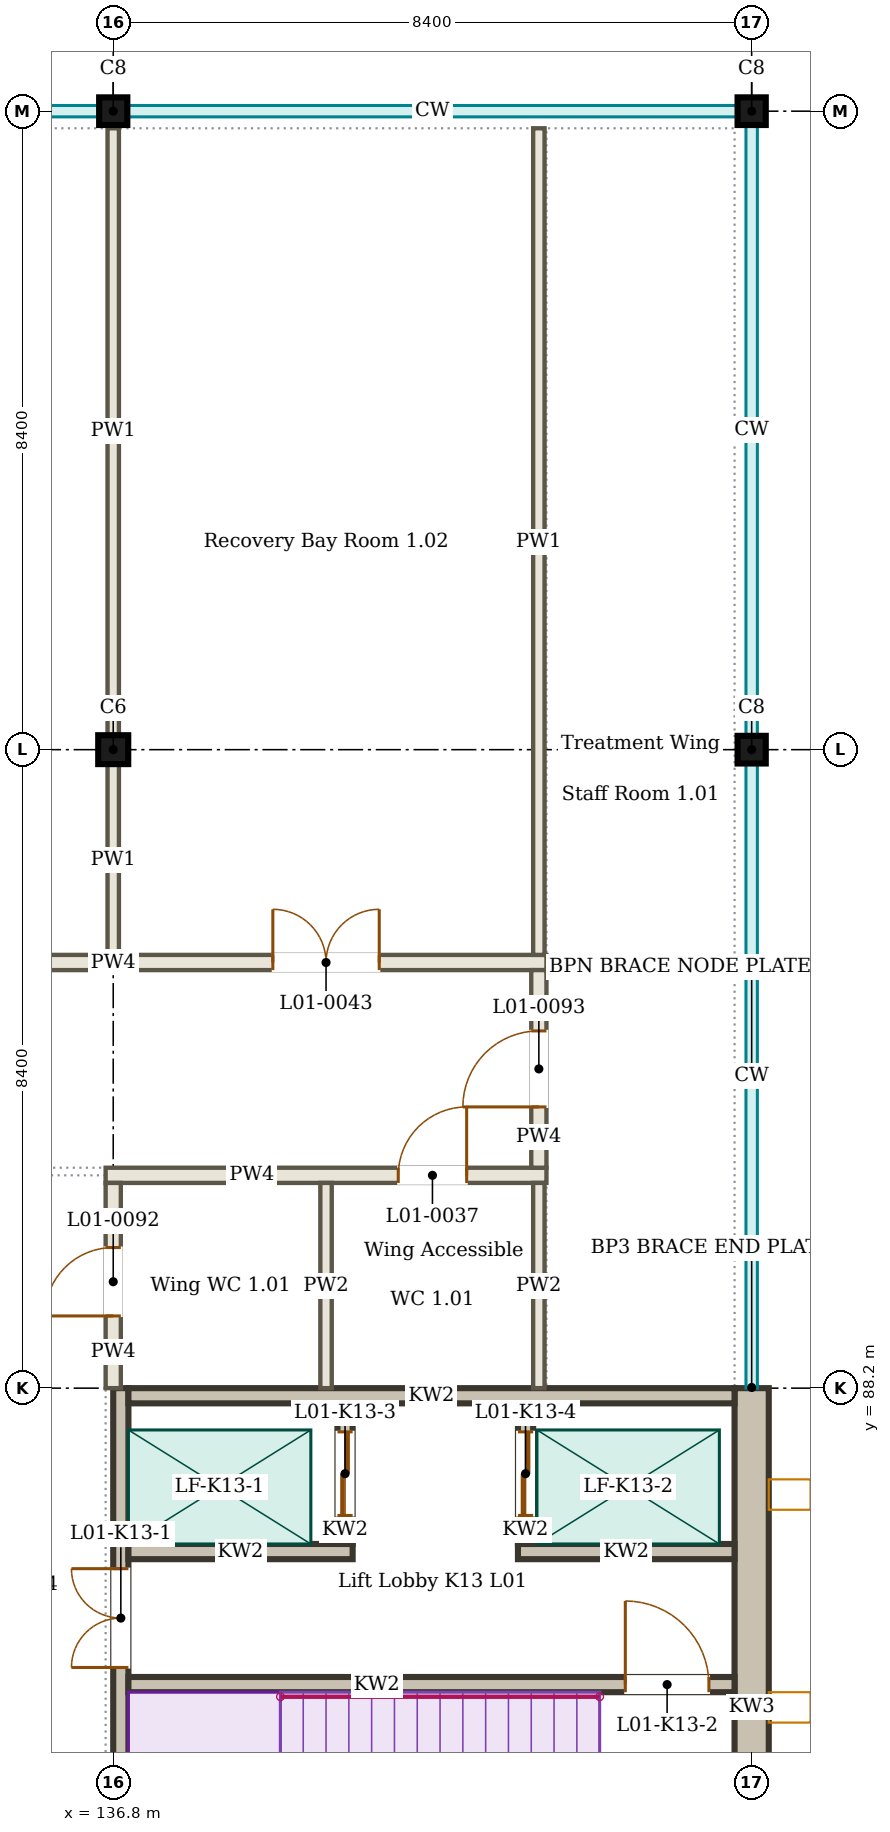
"""IFC4 building model, lengths in metres.
Left out: names, types, materials, properties, quantities, classifications, styles, units other than length and angle.
Written with IfcOpenShell. Run it as: python <this file> out.ifc"""

import sys

from ifc_helpers import new_model, si_unit, direction, frame, frame_2d, origin, origin_2d, place, context, subcontext, project, spatial, rectangle, i_section, extrude, element, fill, save


model = new_model("IFC4")
c1 = context("Model", 3, precision=1e-05, world=origin(), true_north=direction((0.0, 1.0)))
c2 = subcontext(c1, "Body", "Model", "MODEL_VIEW")
j1 = project(units=[si_unit("LENGTHUNIT", "METRE"), si_unit("PLANEANGLEUNIT", "RADIAN")], contexts=[c1])
p1 = place(None, origin())
s1 = spatial("IfcSite", under=j1, at=p1, CompositionType="ELEMENT")
p2 = place(p1, origin())
s2 = spatial("IfcBuilding", under=s1, at=p2, CompositionType="ELEMENT")
p3 = place(p2, frame((0.0, 0.0, 4.5)))
s3 = spatial("IfcBuildingStorey", under=s2, at=p3, CompositionType="ELEMENT", Elevation=4.5)
p4 = place(p3, frame((136.8, 96.6, 0.0), z_axis=(0.0, 0.0, 1.0), x_axis=(1.0, 0.0, 0.0)))
e1 = element("IfcColumn", 1, at=p4, inside=s3, PredefinedType="COLUMN", context=c2, shape_type="SweptSolid", body=[
    extrude(i_section(OverallWidth=0.395, OverallDepth=0.38, WebThickness=0.019, FlangeThickness=0.03, FilletRadius=0.027, at=origin_2d()), origin(), (0.0, 0.0, 1.0), 4.5),
])
for number, where, z_axis, x_axis in (
    (2, (145.2, 96.6, 0.0), (0.0, 0.0, 1.0), (1.0, 0.0, 0.0)),
    (3, (136.8, 105.0, 0.0), (0.0, 0.0, 1.0), (1.0, 0.0, 0.0)),
    (4, (145.2, 105.0, 0.0), (0.0, 0.0, 1.0), (1.0, 0.0, 0.0)),
):
    element("IfcColumn", number, at=place(p3, frame(where, z_axis=z_axis, x_axis=x_axis)), inside=s3, PredefinedType="COLUMN", context=c2, shape_type="SweptSolid", body=[
        extrude(i_section(OverallWidth=0.371, OverallDepth=0.364, WebThickness=0.013, FlangeThickness=0.022, FilletRadius=0.027, at=origin_2d()), origin(), (0.0, 0.0, 1.0), 4.5),
    ])
p5 = place(p3, frame((136.8, 105.16, 3.87), z_axis=(0.0, 0.0, 1.0), x_axis=(1.0, 0.0, 0.0)))
e5 = element("IfcWall", 5, at=p5, inside=s3, PredefinedType="SOLIDWALL", context=c2, shape_type="SweptSolid", body=[
    extrude(rectangle(XDim=8.4, YDim=0.13, at=frame_2d((4.2, 0.0))), origin(), (0.0, 0.0, 1.0), 0.63),
])
p6 = place(p3, frame((136.7, 91.0, 0.0), z_axis=(0.0, 0.0, 1.0), x_axis=(1.0, 0.0, 0.0)))
e6 = element("IfcWall", 6, at=p6, inside=s3, PredefinedType="PARTITIONING", context=c2, shape_type="SweptSolid", body=[
    extrude(rectangle(XDim=5.8, YDim=0.2, at=frame_2d((2.9, 0.0))), origin(), (0.0, 0.0, 1.0), 3.8),
])
p7 = place(p6, frame((3.85, 0.0, 0.0)))
e7 = element("IfcOpeningElement", 7, at=p7, cuts=e6, PredefinedType="OPENING", context=c2, shape_type="SweptSolid", body=[
    extrude(rectangle(XDim=0.9, YDim=2.1, at=frame_2d((0.45, 1.05))), frame((0.0, 0.11, 0.0), z_axis=(0.0, -1.0, 0.0), x_axis=(1.0, 0.0, 0.0)), (0.0, 0.0, 1.0), 0.22),
])
p8 = place(p3, frame((119.9, 93.8, 0.0), z_axis=(0.0, 0.0, 1.0), x_axis=(1.0, 0.0, 0.0)))
e8 = element("IfcWall", 8, at=p8, inside=s3, PredefinedType="PARTITIONING", context=c2, shape_type="SweptSolid", body=[
    extrude(rectangle(XDim=22.6, YDim=0.2, at=frame_2d((11.3, 0.0))), origin(), (0.0, 0.0, 1.0), 3.8),
])
p9 = place(p8, frame((0.8, 0.0, 0.0)))
e9 = element("IfcOpeningElement", 9, at=p9, cuts=e8, PredefinedType="OPENING", context=c2, shape_type="SweptSolid", body=[
    extrude(rectangle(XDim=1.4, YDim=2.1, at=frame_2d((0.7, 1.05))), frame((0.0, 0.11, 0.0), z_axis=(0.0, -1.0, 0.0), x_axis=(1.0, 0.0, 0.0)), (0.0, 0.0, 1.0), 0.22),
])
p10 = place(p8, frame((3.6, 0.0, 0.0)))
e10 = element("IfcOpeningElement", 10, at=p10, cuts=e8, PredefinedType="OPENING", context=c2, shape_type="SweptSolid", body=[
    extrude(rectangle(XDim=1.4, YDim=2.1, at=frame_2d((0.7, 1.05))), frame((0.0, 0.11, 0.0), z_axis=(0.0, -1.0, 0.0), x_axis=(1.0, 0.0, 0.0)), (0.0, 0.0, 1.0), 0.22),
])
p11 = place(p8, frame((6.4, 0.0, 0.0)))
e11 = element("IfcOpeningElement", 11, at=p11, cuts=e8, PredefinedType="OPENING", context=c2, shape_type="SweptSolid", body=[
    extrude(rectangle(XDim=1.4, YDim=2.1, at=frame_2d((0.7, 1.05))), frame((0.0, 0.11, 0.0), z_axis=(0.0, -1.0, 0.0), x_axis=(1.0, 0.0, 0.0)), (0.0, 0.0, 1.0), 0.22),
])
p12 = place(p8, frame((9.2, 0.0, 0.0)))
e12 = element("IfcOpeningElement", 12, at=p12, cuts=e8, PredefinedType="OPENING", context=c2, shape_type="SweptSolid", body=[
    extrude(rectangle(XDim=1.4, YDim=2.1, at=frame_2d((0.7, 1.05))), frame((0.0, 0.11, 0.0), z_axis=(0.0, -1.0, 0.0), x_axis=(1.0, 0.0, 0.0)), (0.0, 0.0, 1.0), 0.22),
])
p13 = place(p8, frame((13.4, 0.0, 0.0)))
e13 = element("IfcOpeningElement", 13, at=p13, cuts=e8, PredefinedType="OPENING", context=c2, shape_type="SweptSolid", body=[
    extrude(rectangle(XDim=1.4, YDim=2.1, at=frame_2d((0.7, 1.05))), frame((0.0, 0.11, 0.0), z_axis=(0.0, -1.0, 0.0), x_axis=(1.0, 0.0, 0.0)), (0.0, 0.0, 1.0), 0.22),
])
p14 = place(p8, frame((19.0, 0.0, 0.0)))
e14 = element("IfcOpeningElement", 14, at=p14, cuts=e8, PredefinedType="OPENING", context=c2, shape_type="SweptSolid", body=[
    extrude(rectangle(XDim=1.4, YDim=2.1, at=frame_2d((0.7, 1.05))), frame((0.0, 0.11, 0.0), z_axis=(0.0, -1.0, 0.0), x_axis=(1.0, 0.0, 0.0)), (0.0, 0.0, 1.0), 0.22),
])
p15 = place(p3, frame((136.8, 88.2, 0.0), z_axis=(0.0, 0.0, 1.0), x_axis=(0.0, 1.0, 0.0)))
e15 = element("IfcWall", 15, at=p15, inside=s3, PredefinedType="PARTITIONING", context=c2, shape_type="SweptSolid", body=[
    extrude(rectangle(XDim=2.7, YDim=0.2, at=frame_2d((1.35, 0.0))), origin(), (0.0, 0.0, 1.0), 3.8),
])
p16 = place(p15, frame((0.95, 0.0, 0.0)))
e16 = element("IfcOpeningElement", 16, at=p16, cuts=e15, PredefinedType="OPENING", context=c2, shape_type="SweptSolid", body=[
    extrude(rectangle(XDim=0.9, YDim=2.1, at=frame_2d((0.45, 1.05))), frame((0.0, 0.11, 0.0), z_axis=(0.0, -1.0, 0.0), x_axis=(1.0, 0.0, 0.0)), (0.0, 0.0, 1.0), 0.22),
])
p17 = place(p3, frame((136.8, 93.9, 0.0), z_axis=(0.0, 0.0, 1.0), x_axis=(0.0, 1.0, 0.0)))
e17 = element("IfcWall", 17, at=p17, inside=s3, PredefinedType="PARTITIONING", context=c2, shape_type="SweptSolid", body=[
    extrude(rectangle(XDim=2.503, YDim=0.15, at=frame_2d((1.251, 0.0))), origin(), (0.0, 0.0, 1.0), 3.8),
])
p18 = place(p3, frame((136.8, 96.798, 0.0), z_axis=(0.0, 0.0, 1.0), x_axis=(0.0, 1.0, 0.0)))
e18 = element("IfcWall", 18, at=p18, inside=s3, PredefinedType="PARTITIONING", context=c2, shape_type="SweptSolid", body=[
    extrude(rectangle(XDim=7.977, YDim=0.15, at=frame_2d((3.989, 0.0))), origin(), (0.0, 0.0, 1.0), 3.8),
])
for number, where, z_axis, x_axis in (
    (19, (139.6, 88.2, 0.0), (0.0, 0.0, 1.0), (0.0, 1.0, 0.0)),
    (20, (142.4, 88.2, 0.0), (0.0, 0.0, 1.0), (0.0, 1.0, 0.0)),
):
    element("IfcWall", number, at=place(p3, frame(where, z_axis=z_axis, x_axis=x_axis)), inside=s3, PredefinedType="PARTITIONING", context=c2, shape_type="SweptSolid", body=[
        extrude(rectangle(XDim=2.7, YDim=0.15, at=frame_2d((1.35, 0.0))), origin(), (0.0, 0.0, 1.0), 3.95),
    ])
p19 = place(p3, frame((142.4, 91.1, 0.0), z_axis=(0.0, 0.0, 1.0), x_axis=(0.0, 1.0, 0.0)))
e21 = element("IfcWall", 21, at=p19, inside=s3, PredefinedType="PARTITIONING", context=c2, shape_type="SweptSolid", body=[
    extrude(rectangle(XDim=2.6, YDim=0.2, at=frame_2d((1.3, 0.0))), origin(), (0.0, 0.0, 1.0), 3.95),
])
p20 = place(p19, frame((0.8, 0.0, 0.0)))
e22 = element("IfcOpeningElement", 22, at=p20, cuts=e21, PredefinedType="OPENING", context=c2, shape_type="SweptSolid", body=[
    extrude(rectangle(XDim=1.0, YDim=2.1, at=frame_2d((0.5, 1.05))), frame((0.0, 0.11, 0.0), z_axis=(0.0, -1.0, 0.0), x_axis=(1.0, 0.0, 0.0)), (0.0, 0.0, 1.0), 0.22),
])
p21 = place(p3, frame((142.4, 93.9, 0.0), z_axis=(0.0, 0.0, 1.0), x_axis=(0.0, 1.0, 0.0)))
e23 = element("IfcWall", 23, at=p21, inside=s3, PredefinedType="PARTITIONING", context=c2, shape_type="SweptSolid", body=[
    extrude(rectangle(XDim=10.875, YDim=0.15, at=frame_2d((5.438, 0.0))), origin(), (0.0, 0.0, 1.0), 3.8),
])
p22 = place(p3, frame((136.9, 79.8, 0.0), z_axis=(0.0, 0.0, 1.0), x_axis=(0.0, 1.0, 0.0)))
e24 = element("IfcWall", 24, at=p22, inside=s3, PredefinedType="SOLIDWALL", context=c2, shape_type="SweptSolid", body=[
    extrude(rectangle(XDim=8.4, YDim=0.2, at=frame_2d((4.2, 0.0))), origin(), (0.0, 0.0, 1.0), 4.5),
])
p23 = place(p22, frame((4.725, 0.0, 0.0)))
e25 = element("IfcOpeningElement", 25, at=p23, cuts=e24, PredefinedType="OPENING", context=c2, shape_type="SweptSolid", body=[
    extrude(rectangle(XDim=1.3, YDim=2.1, at=frame_2d((0.65, 1.05))), frame((0.0, 0.11, 0.0), z_axis=(0.0, -1.0, 0.0), x_axis=(1.0, 0.0, 0.0)), (0.0, 0.0, 1.0), 0.22),
])
p24 = place(p3, frame((145.2, 79.8, 0.0), z_axis=(0.0, 0.0, 1.0), x_axis=(0.0, 1.0, 0.0)))
e26 = element("IfcWall", 26, at=p24, inside=s3, PredefinedType="SOLIDWALL", context=c2, shape_type="SweptSolid", body=[
    extrude(rectangle(XDim=8.4, YDim=0.45, at=frame_2d((4.2, 0.0))), origin(), (0.0, 0.0, 1.0), 4.5),
])
p25 = place(p3, frame((137.0, 88.1, 0.0), z_axis=(0.0, 0.0, 1.0), x_axis=(1.0, 0.0, 0.0)))
e27 = element("IfcWall", 27, at=p25, inside=s3, PredefinedType="SOLIDWALL", context=c2, shape_type="SweptSolid", body=[
    extrude(rectangle(XDim=7.975, YDim=0.2, at=frame_2d((3.988, 0.0))), origin(), (0.0, 0.0, 1.0), 4.5),
])
p26 = place(p3, frame((137.0, 84.3, 0.0), z_axis=(0.0, 0.0, 1.0), x_axis=(1.0, 0.0, 0.0)))
e28 = element("IfcWall", 28, at=p26, inside=s3, PredefinedType="SOLIDWALL", context=c2, shape_type="SweptSolid", body=[
    extrude(rectangle(XDim=7.975, YDim=0.2, at=frame_2d((3.988, 0.0))), origin(), (0.0, 0.0, 1.0), 4.5),
])
p27 = place(p26, frame((6.538, 0.0, 0.0)))
e29 = element("IfcOpeningElement", 29, at=p27, cuts=e28, PredefinedType="OPENING", context=c2, shape_type="SweptSolid", body=[
    extrude(rectangle(XDim=1.1, YDim=2.1, at=frame_2d((0.55, 1.05))), frame((0.0, 0.11, 0.0), z_axis=(0.0, -1.0, 0.0), x_axis=(1.0, 0.0, 0.0)), (0.0, 0.0, 1.0), 0.22),
])
p28 = place(p3, frame((137.0, 86.05, 0.0), z_axis=(0.0, 0.0, 1.0), x_axis=(1.0, 0.0, 0.0)))
e30 = element("IfcWall", 30, at=p28, inside=s3, PredefinedType="SOLIDWALL", context=c2, shape_type="SweptSolid", body=[
    extrude(rectangle(XDim=2.95, YDim=0.2, at=frame_2d((1.475, 0.0))), origin(), (0.0, 0.0, 1.0), 4.5),
])
p29 = place(p3, frame((142.125, 86.05, 0.0), z_axis=(0.0, 0.0, 1.0), x_axis=(1.0, 0.0, 0.0)))
e31 = element("IfcWall", 31, at=p29, inside=s3, PredefinedType="SOLIDWALL", context=c2, shape_type="SweptSolid", body=[
    extrude(rectangle(XDim=2.85, YDim=0.2, at=frame_2d((1.425, 0.0))), origin(), (0.0, 0.0, 1.0), 4.5),
])
p30 = place(p3, frame((139.85, 86.15, 0.0), z_axis=(0.0, 0.0, 1.0), x_axis=(0.0, 1.0, 0.0)))
e32 = element("IfcWall", 32, at=p30, inside=s3, PredefinedType="SOLIDWALL", context=c2, shape_type="SweptSolid", body=[
    extrude(rectangle(XDim=1.85, YDim=0.2, at=frame_2d((0.925, 0.0))), origin(), (0.0, 0.0, 1.0), 4.5),
])
p31 = place(p30, frame((0.375, 0.0, 0.0)))
e33 = element("IfcOpeningElement", 33, at=p31, cuts=e32, PredefinedType="OPENING", context=c2, shape_type="SweptSolid", body=[
    extrude(rectangle(XDim=1.1, YDim=2.1, at=frame_2d((0.55, 1.05))), frame((0.0, 0.11, 0.0), z_axis=(0.0, -1.0, 0.0), x_axis=(1.0, 0.0, 0.0)), (0.0, 0.0, 1.0), 0.22),
])
p32 = place(p3, frame((142.225, 86.15, 0.0), z_axis=(0.0, 0.0, 1.0), x_axis=(0.0, 1.0, 0.0)))
e34 = element("IfcWall", 34, at=p32, inside=s3, PredefinedType="SOLIDWALL", context=c2, shape_type="SweptSolid", body=[
    extrude(rectangle(XDim=1.85, YDim=0.2, at=frame_2d((0.925, 0.0))), origin(), (0.0, 0.0, 1.0), 4.5),
])
p33 = place(p32, frame((0.375, 0.0, 0.0)))
e35 = element("IfcOpeningElement", 35, at=p33, cuts=e34, PredefinedType="OPENING", context=c2, shape_type="SweptSolid", body=[
    extrude(rectangle(XDim=1.1, YDim=2.1, at=frame_2d((0.55, 1.05))), frame((0.0, 0.11, 0.0), z_axis=(0.0, -1.0, 0.0), x_axis=(1.0, 0.0, 0.0)), (0.0, 0.0, 1.0), 0.22),
])
p34 = place(p7, origin())
e36 = element("IfcDoor", 36, at=p34, inside=s3, OperationType="SINGLE_SWING_RIGHT", PredefinedType="DOOR", context=c2, shape_type="SweptSolid", body=[
    extrude(rectangle(XDim=0.9, YDim=2.1, at=frame_2d((0.45, 1.05))), frame((0.0, 0.025, 0.0), z_axis=(0.0, -1.0, 0.0), x_axis=(1.0, 0.0, 0.0)), (0.0, 0.0, 1.0), 0.05),
])
fill(e7, e36)
p35 = place(p14, origin())
e37 = element("IfcDoor", 37, at=p35, inside=s3, OperationType="DOUBLE_DOOR_SINGLE_SWING", PredefinedType="DOOR", context=c2, shape_type="SweptSolid", body=[
    extrude(rectangle(XDim=1.4, YDim=2.1, at=frame_2d((0.7, 1.05))), frame((0.0, 0.025, 0.0), z_axis=(0.0, -1.0, 0.0), x_axis=(1.0, 0.0, 0.0)), (0.0, 0.0, 1.0), 0.05),
])
fill(e14, e37)
p36 = place(p16, origin())
e38 = element("IfcDoor", 38, at=p36, inside=s3, OperationType="SINGLE_SWING_LEFT", PredefinedType="DOOR", context=c2, shape_type="SweptSolid", body=[
    extrude(rectangle(XDim=0.9, YDim=2.1, at=frame_2d((0.45, 1.05))), frame((0.0, 0.025, 0.0), z_axis=(0.0, -1.0, 0.0), x_axis=(1.0, 0.0, 0.0)), (0.0, 0.0, 1.0), 0.05),
])
fill(e16, e38)
p37 = place(p20, origin())
e39 = element("IfcDoor", 39, at=p37, inside=s3, OperationType="SINGLE_SWING_LEFT", PredefinedType="DOOR", context=c2, shape_type="SweptSolid", body=[
    extrude(rectangle(XDim=1.0, YDim=2.1, at=frame_2d((0.5, 1.05))), frame((0.0, 0.025, 0.0), z_axis=(0.0, -1.0, 0.0), x_axis=(1.0, 0.0, 0.0)), (0.0, 0.0, 1.0), 0.05),
])
fill(e22, e39)
p38 = place(p23, origin())
e40 = element("IfcDoor", 40, at=p38, inside=s3, OperationType="DOUBLE_DOOR_DOUBLE_SWING", PredefinedType="DOOR", context=c2, shape_type="SweptSolid", body=[
    extrude(rectangle(XDim=1.3, YDim=2.1, at=frame_2d((0.65, 1.05))), frame((0.0, 0.025, 0.0), z_axis=(0.0, -1.0, 0.0), x_axis=(1.0, 0.0, 0.0)), (0.0, 0.0, 1.0), 0.05),
])
fill(e25, e40)
p39 = place(p27, origin())
e41 = element("IfcDoor", 41, at=p39, inside=s3, OperationType="SINGLE_SWING_LEFT", PredefinedType="DOOR", context=c2, shape_type="SweptSolid", body=[
    extrude(rectangle(XDim=1.1, YDim=2.1, at=frame_2d((0.55, 1.05))), frame((0.0, 0.025, 0.0), z_axis=(0.0, -1.0, 0.0), x_axis=(1.0, 0.0, 0.0)), (0.0, 0.0, 1.0), 0.05),
])
fill(e29, e41)
p40 = place(p31, origin())
e42 = element("IfcDoor", 42, at=p40, inside=s3, OperationType="DOUBLE_DOOR_SLIDING", PredefinedType="DOOR", context=c2, shape_type="SweptSolid", body=[
    extrude(rectangle(XDim=1.1, YDim=2.1, at=frame_2d((0.55, 1.05))), frame((0.0, 0.025, 0.0), z_axis=(0.0, -1.0, 0.0), x_axis=(1.0, 0.0, 0.0)), (0.0, 0.0, 1.0), 0.05),
])
fill(e33, e42)
p41 = place(p33, origin())
e43 = element("IfcDoor", 43, at=p41, inside=s3, OperationType="DOUBLE_DOOR_SLIDING", PredefinedType="DOOR", context=c2, shape_type="SweptSolid", body=[
    extrude(rectangle(XDim=1.1, YDim=2.1, at=frame_2d((0.55, 1.05))), frame((0.0, 0.025, 0.0), z_axis=(0.0, -1.0, 0.0), x_axis=(1.0, 0.0, 0.0)), (0.0, 0.0, 1.0), 0.05),
])
fill(e35, e43)
save(model, sys.argv[1])
